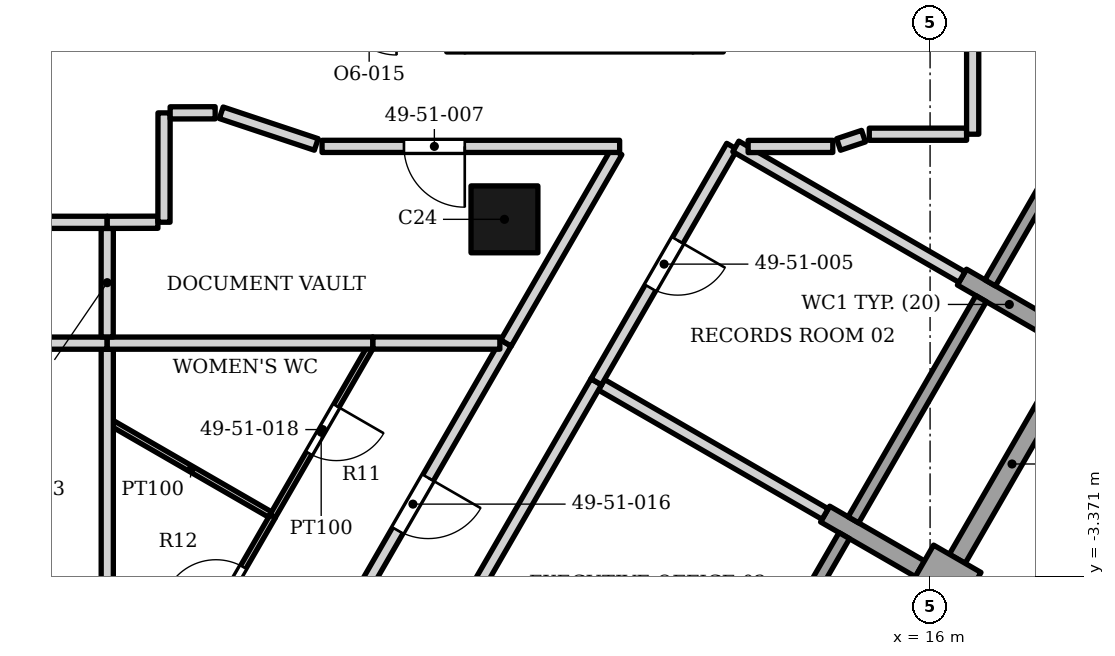
"""IFC4 building model, lengths in metres.
Left out: names, types, materials, properties, quantities, classifications, styles, units other than length and angle.
Written with IfcOpenShell. Run it as: python <this file> out.ifc"""

import sys

from ifc_helpers import new_model, si_unit, direction, frame, frame_2d, origin, origin_2d, place, context, subcontext, project, spatial, rectangle, extrude, element, fill, save


model = new_model("IFC4")
c1 = context("Model", 3, precision=1e-05, world=origin(), true_north=direction((0.0, 1.0)))
c2 = subcontext(c1, "Body", "Model", "MODEL_VIEW")
j1 = project(units=[si_unit("LENGTHUNIT", "METRE"), si_unit("PLANEANGLEUNIT", "RADIAN")], contexts=[c1])
p1 = place(None, origin())
s1 = spatial("IfcSite", under=j1, at=p1, CompositionType="ELEMENT")
p2 = place(p1, origin())
s2 = spatial("IfcBuilding", under=s1, at=p2, CompositionType="ELEMENT")
p3 = place(p2, frame((0.0, 0.0, 208.1)))
s3 = spatial("IfcBuildingStorey", under=s2, at=p3, CompositionType="ELEMENT", Elevation=208.1)
p4 = place(p3, frame((9.0, 2.5, 0.0), z_axis=(0.0, 0.0, 1.0), x_axis=(1.0, 0.0, 0.0)))
e1 = element("IfcColumn", 1, at=p4, inside=s3, PredefinedType="COLUMN", context=c2, shape_type="SweptSolid", body=[
    extrude(rectangle(XDim=1.1, YDim=1.1, at=origin_2d()), origin(), (0.0, 0.0, 1.0), 3.9),
])
p5 = place(p3, frame((16.612, -3.697, 0.0), z_axis=(0.0, 0.0, 1.0), x_axis=(-0.865964261186, 0.500105887137, 0.0)))
e2 = element("IfcWall", 2, at=p5, inside=s3, PredefinedType="SOLIDWALL", context=c2, shape_type="SweptSolid", body=[
    extrude(rectangle(XDim=0.9, YDim=0.9, at=frame_2d((0.45, 0.0))), origin(), (0.0, 0.0, 1.0), 3.0),
])
p6 = place(p3, frame((15.833, -3.247, 0.0), z_axis=(0.0, 0.0, 1.0), x_axis=(-0.866047807691, 0.499961193289, 0.0)))
e3 = element("IfcWall", 3, at=p6, inside=s3, PredefinedType="SOLIDWALL", context=c2, shape_type="SweptSolid", body=[
    extrude(rectangle(XDim=1.8, YDim=0.3, at=frame_2d((0.9, 0.0))), origin(), (0.0, 0.0, 1.0), 3.0),
])
p7 = place(p3, frame((16.524, 1.55, 0.0), z_axis=(0.0, 0.0, 1.0), x_axis=(0.866013897511, -0.50001992892, 0.0)))
e4 = element("IfcWall", 4, at=p7, inside=s3, PredefinedType="SOLIDWALL", context=c2, shape_type="SweptSolid", body=[
    extrude(rectangle(XDim=1.8, YDim=0.3, at=frame_2d((0.9, 0.0))), origin(), (0.0, 0.0, 1.0), 3.0),
])
p8 = place(p3, frame((12.489, -6.339, 0.0), z_axis=(0.0, 0.0, 1.0), x_axis=(0.500027713859, 0.866009402589, 0.0)))
e5 = element("IfcWall", 5, at=p8, inside=s3, PredefinedType="ELEMENTEDWALL", context=c2, shape_type="SweptSolid", body=[
    extrude(rectangle(XDim=4.2, YDim=0.2, at=frame_2d((2.1, 0.0))), origin(), (0.0, 0.0, 1.0), 3.0),
])
p9 = place(p3, frame((16.448, -3.082, 0.0), z_axis=(0.0, 0.0, 1.0), x_axis=(0.500012057535, 0.866018442252, 0.0)))
e6 = element("IfcWall", 6, at=p9, inside=s3, PredefinedType="SOLIDWALL", context=c2, shape_type="SweptSolid", body=[
    extrude(rectangle(XDim=3.6, YDim=0.3, at=frame_2d((1.8, 0.0))), origin(), (0.0, 0.0, 1.0), 3.0),
])
p10 = place(p3, frame((14.739, -2.442, 0.0), z_axis=(0.0, 0.0, 1.0), x_axis=(0.500027713859, 0.866009402589, 0.0)))
e7 = element("IfcWall", 7, at=p10, inside=s3, PredefinedType="ELEMENTEDWALL", context=c2, shape_type="SweptSolid", body=[
    extrude(rectangle(XDim=4.2, YDim=0.2, at=frame_2d((2.1, 0.0))), origin(), (0.0, 0.0, 1.0), 3.0),
])
p11 = place(p3, frame((16.989, 1.455, 0.0), z_axis=(0.0, 0.0, 1.0), x_axis=(0.500002543286, 0.866023935413, 0.0)))
e8 = element("IfcWall", 8, at=p11, inside=s3, PredefinedType="ELEMENTEDWALL", context=c2, shape_type="SweptSolid", body=[
    extrude(rectangle(XDim=4.2, YDim=0.2, at=frame_2d((2.1, 0.0))), origin(), (0.0, 0.0, 1.0), 3.0),
])
p12 = place(p3, frame((2.469, -10.893, 0.0), z_axis=(0.0, 0.0, 1.0), x_axis=(0.499769731946, 0.866158308296, 0.0)))
e9 = element("IfcWall", 9, at=p12, inside=s3, PredefinedType="PARTITIONING", context=c2, shape_type="SweptSolid", body=[
    extrude(rectangle(XDim=13.113, YDim=0.2, at=frame_2d((6.557, 0.0))), origin(), (0.0, 0.0, 1.0), 2.884),
])
p13 = place(p12, frame((3.048, 0.0, 0.0)))
e10 = element("IfcOpeningElement", 10, at=p13, cuts=e9, PredefinedType="OPENING", context=c2, shape_type="SweptSolid", body=[
    extrude(rectangle(XDim=0.9, YDim=2.1, at=frame_2d((0.45, 1.05))), frame((0.0, 0.11, 0.0), z_axis=(0.0, -1.0, 0.0), x_axis=(1.0, 0.0, 0.0)), (0.0, 0.0, 1.0), 0.22),
])
p14 = place(p12, frame((9.556, 0.0, 0.0)))
e11 = element("IfcOpeningElement", 11, at=p14, cuts=e9, PredefinedType="OPENING", context=c2, shape_type="SweptSolid", body=[
    extrude(rectangle(XDim=1.0, YDim=2.1, at=frame_2d((0.5, 1.05))), frame((0.0, 0.11, 0.0), z_axis=(0.0, -1.0, 0.0), x_axis=(1.0, 0.0, 0.0)), (0.0, 0.0, 1.0), 0.22),
])
p15 = place(p3, frame((3.821, -4.748, 0.0), z_axis=(0.0, 0.0, 1.0), x_axis=(0.500518638442, 0.865725760603, 0.0)))
e12 = element("IfcWall", 12, at=p15, inside=s3, PredefinedType="PARTITIONING", context=c2, shape_type="SweptSolid", body=[
    extrude(rectangle(XDim=2.733, YDim=0.1, at=frame_2d((1.367, 0.0))), origin(), (0.0, 0.0, 1.0), 2.884),
])
p16 = place(p15, frame((0.867, 0.0, 0.0)))
e13 = element("IfcOpeningElement", 13, at=p16, cuts=e12, PredefinedType="OPENING", context=c2, shape_type="SweptSolid", body=[
    extrude(rectangle(XDim=0.9, YDim=2.1, at=frame_2d((0.45, 1.05))), frame((0.0, 0.06, 0.0), z_axis=(0.0, -1.0, 0.0), x_axis=(1.0, 0.0, 0.0)), (0.0, 0.0, 1.0), 0.12),
])
p17 = place(p3, frame((5.189, -2.379, 0.0), z_axis=(0.0, 0.0, 1.0), x_axis=(0.500398861512, 0.865794998482, 0.0)))
e14 = element("IfcWall", 14, at=p17, inside=s3, PredefinedType="PARTITIONING", context=c2, shape_type="SweptSolid", body=[
    extrude(rectangle(XDim=3.187, YDim=0.1, at=frame_2d((1.593, 0.0))), origin(), (0.0, 0.0, 1.0), 3.73),
])
p18 = place(p17, frame((1.192, 0.0, 0.0)))
e15 = element("IfcOpeningElement", 15, at=p18, cuts=e14, PredefinedType="OPENING", context=c2, shape_type="SweptSolid", body=[
    extrude(rectangle(XDim=0.9, YDim=2.1, at=frame_2d((0.45, 1.05))), frame((0.0, 0.06, 0.0), z_axis=(0.0, -1.0, 0.0), x_axis=(1.0, 0.0, 0.0)), (0.0, 0.0, 1.0), 0.12),
])
p19 = place(p3, frame((2.552, -0.858, 0.0), z_axis=(0.0, 0.0, 1.0), x_axis=(0.866076950936, -0.499910707084, 0.0)))
e16 = element("IfcWall", 16, at=p19, inside=s3, PredefinedType="PARTITIONING", context=c2, shape_type="SweptSolid", body=[
    extrude(rectangle(XDim=2.994, YDim=0.1, at=frame_2d((1.497, 0.0))), origin(), (0.0, 0.0, 1.0), 2.884),
])
p20 = place(p3, frame((10.596, -0.221, 0.0), z_axis=(0.0, 0.0, 1.0), x_axis=(0.86582081126, -0.500354197333, 0.0)))
e17 = element("IfcWall", 17, at=p20, inside=s3, PredefinedType="PARTITIONING", context=c2, shape_type="SweptSolid", body=[
    extrude(rectangle(XDim=4.248, YDim=0.2, at=frame_2d((2.124, 0.0))), origin(), (0.0, 0.0, 1.0), 3.052),
])
p21 = place(p3, frame((3.759, -11.864, 0.0), z_axis=(0.0, 0.0, 1.0), x_axis=(0.499997969693, 0.866026575979, 0.0)))
e18 = element("IfcWall", 18, at=p21, inside=s3, PredefinedType="PARTITIONING", context=c2, shape_type="SweptSolid", body=[
    extrude(rectangle(XDim=13.5, YDim=0.2, at=frame_2d((6.75, 0.0))), origin(), (0.0, 0.0, 1.0), 2.884),
])
p22 = place(p21, frame((1.8, 0.0, 0.0)))
e19 = element("IfcOpeningElement", 19, at=p22, cuts=e18, PredefinedType="OPENING", context=c2, shape_type="SweptSolid", body=[
    extrude(rectangle(XDim=0.9, YDim=2.1, at=frame_2d((0.45, 1.05))), frame((0.0, 0.11, 0.0), z_axis=(0.0, -1.0, 0.0), x_axis=(1.0, 0.0, 0.0)), (0.0, 0.0, 1.0), 0.22),
])
p23 = place(p21, frame((8.5, 0.0, 0.0)))
e20 = element("IfcOpeningElement", 20, at=p23, cuts=e18, PredefinedType="OPENING", context=c2, shape_type="SweptSolid", body=[
    extrude(rectangle(XDim=1.0, YDim=2.4, at=frame_2d((0.5, 1.2))), frame((0.0, 0.11, 0.0), z_axis=(0.0, -1.0, 0.0), x_axis=(1.0, 0.0, 0.0)), (0.0, 0.0, 1.0), 0.22),
])
p24 = place(p3, frame((2.468, -4.835, 0.0), z_axis=(0.0, 0.0, 1.0), x_axis=(0.0, 1.0, 0.0)))
e21 = element("IfcWall", 21, at=p24, inside=s3, PredefinedType="PARTITIONING", context=c2, shape_type="SweptSolid", body=[
    extrude(rectangle(XDim=5.199, YDim=0.2, at=frame_2d((2.6, 0.0))), origin(), (0.0, 0.0, 1.0), 3.73),
])
p25 = place(p3, frame((-4.086, 0.464, 0.0), z_axis=(0.0, 0.0, 1.0), x_axis=(0.499999074482, -0.866025938132, 0.0)))
e22 = element("IfcWall", 22, at=p25, inside=s3, PredefinedType="PARTITIONING", context=c2, shape_type="SweptSolid", body=[
    extrude(rectangle(XDim=13.013, YDim=0.2, at=frame_2d((6.507, 0.0))), origin(), (0.0, 0.0, 1.0), 2.884),
])
p26 = place(p25, frame((2.607, 0.0, 0.0)))
e23 = element("IfcOpeningElement", 23, at=p26, cuts=e22, PredefinedType="OPENING", context=c2, shape_type="SweptSolid", body=[
    extrude(rectangle(XDim=0.9, YDim=2.1, at=frame_2d((0.45, 1.05))), frame((0.0, 0.11, 0.0), z_axis=(0.0, -1.0, 0.0), x_axis=(1.0, 0.0, 0.0)), (0.0, 0.0, 1.0), 0.22),
])
p27 = place(p3, frame((-3.986, 0.464, 0.0), z_axis=(0.0, 0.0, 1.0), x_axis=(1.0, 0.0, 0.0)))
e24 = element("IfcWall", 24, at=p27, inside=s3, PredefinedType="PARTITIONING", context=c2, shape_type="SweptSolid", body=[
    extrude(rectangle(XDim=6.452, YDim=0.2, at=frame_2d((3.226, 0.0))), origin(), (0.0, 0.0, 1.0), 2.884),
])
p28 = place(p3, frame((6.833, 0.466, 0.0), z_axis=(0.0, 0.0, 1.0), x_axis=(0.999999665949, -0.000817374785, 0.0)))
e25 = element("IfcWall", 25, at=p28, inside=s3, PredefinedType="PARTITIONING", context=c2, shape_type="SweptSolid", body=[
    extrude(rectangle(XDim=2.091, YDim=0.2, at=frame_2d((1.045, 0.0))), origin(), (0.0, 0.0, 1.0), 3.73),
])
p29 = place(p3, frame((2.468, 0.464, 0.0), z_axis=(0.0, 0.0, 1.0), x_axis=(0.999999923373, 0.000391476957, 0.0)))
e26 = element("IfcWall", 26, at=p29, inside=s3, PredefinedType="PARTITIONING", context=c2, shape_type="SweptSolid", body=[
    extrude(rectangle(XDim=4.365, YDim=0.2, at=frame_2d((2.183, 0.0))), origin(), (0.0, 0.0, 1.0), 3.73),
])
p30 = place(p3, frame((9.025, 0.466, 0.0), z_axis=(0.0, 0.0, 1.0), x_axis=(0.500421935149, 0.865781662327, 0.0)))
e27 = element("IfcWall", 27, at=p30, inside=s3, PredefinedType="PARTITIONING", context=c2, shape_type="SweptSolid", body=[
    extrude(rectangle(XDim=3.635, YDim=0.2, at=frame_2d((1.817, 0.0))), origin(), (0.0, 0.0, 1.0), 3.052),
])
p31 = place(p3, frame((2.466, 0.566, 0.0), z_axis=(0.0, 0.0, 1.0), x_axis=(0.000820793157, 0.999999663149, 0.0)))
e28 = element("IfcWall", 28, at=p31, inside=s3, PredefinedType="PARTITIONING", context=c2, shape_type="SweptSolid", body=[
    extrude(rectangle(XDim=1.785, YDim=0.2, at=frame_2d((0.892, 0.0))), origin(), (0.0, 0.0, 1.0), 3.73),
])
p32 = place(p3, frame((-3.4, 2.452, 0.0), z_axis=(0.0, 0.0, 1.0), x_axis=(0.999999957561, -0.000291338898, 0.0)))
e29 = element("IfcWall", 29, at=p32, inside=s3, PredefinedType="PARTITIONING", context=c2, shape_type="SweptSolid", body=[
    extrude(rectangle(XDim=5.866, YDim=0.2, at=frame_2d((2.933, 0.0))), origin(), (0.0, 0.0, 1.0), 3.73),
])
p33 = place(p32, frame((2.433, 0.0, 0.0)))
e30 = element("IfcOpeningElement", 30, at=p33, cuts=e29, PredefinedType="OPENING", context=c2, shape_type="SweptSolid", body=[
    extrude(rectangle(XDim=1.0, YDim=2.4, at=frame_2d((0.5, 1.2))), frame((0.0, 0.11, 0.0), z_axis=(0.0, -1.0, 0.0), x_axis=(1.0, 0.0, 0.0)), (0.0, 0.0, 1.0), 0.22),
])
p34 = place(p3, frame((2.468, 2.451, 0.0), z_axis=(0.0, 0.0, 1.0), x_axis=(0.999997893042, 0.002052781599, 0.0)))
e31 = element("IfcWall", 31, at=p34, inside=s3, PredefinedType="PARTITIONING", context=c2, shape_type="SweptSolid", body=[
    extrude(rectangle(XDim=0.833, YDim=0.2, at=frame_2d((0.416, 0.0))), origin(), (0.0, 0.0, 1.0), 3.73),
])
p35 = place(p3, frame((6.0, 3.7, 0.0), z_axis=(0.0, 0.0, 1.0), x_axis=(1.0, 0.0, 0.0)))
e32 = element("IfcWall", 32, at=p35, inside=s3, PredefinedType="PARTITIONING", context=c2, shape_type="SweptSolid", body=[
    extrude(rectangle(XDim=4.894, YDim=0.2, at=frame_2d((2.447, 0.0))), origin(), (0.0, 0.0, 1.0), 3.332),
])
p36 = place(p35, frame((1.347, 0.0, 0.0)))
e33 = element("IfcOpeningElement", 33, at=p36, cuts=e32, PredefinedType="OPENING", context=c2, shape_type="SweptSolid", body=[
    extrude(rectangle(XDim=1.0, YDim=2.1, at=frame_2d((0.5, 1.05))), frame((0.0, 0.11, 0.0), z_axis=(0.0, -1.0, 0.0), x_axis=(1.0, 0.0, 0.0)), (0.0, 0.0, 1.0), 0.22),
])
p37 = place(p3, frame((10.51, -0.171, 0.0), z_axis=(0.0, 0.0, 1.0), x_axis=(0.499676732976, 0.86621196166, 0.0)))
e34 = element("IfcWall", 34, at=p37, inside=s3, PredefinedType="PARTITIONING", context=c2, shape_type="SweptSolid", body=[
    extrude(rectangle(XDim=4.469, YDim=0.2, at=frame_2d((2.234, 0.0))), origin(), (0.0, 0.0, 1.0), 3.73),
])
p38 = place(p37, frame((1.783, 0.0, 0.0)))
e35 = element("IfcOpeningElement", 35, at=p38, cuts=e34, PredefinedType="OPENING", context=c2, shape_type="SweptSolid", body=[
    extrude(rectangle(XDim=0.9, YDim=2.1, at=frame_2d((0.45, 1.05))), frame((0.0, 0.11, 0.0), z_axis=(0.0, -1.0, 0.0), x_axis=(1.0, 0.0, 0.0)), (0.0, 0.0, 1.0), 0.22),
])
p39 = place(p3, frame((12.805, 3.699, 0.0), z_axis=(0.0, 0.0, 1.0), x_axis=(0.86584756398, -0.500307901146, 0.0)))
e36 = element("IfcWall", 36, at=p39, inside=s3, PredefinedType="PARTITIONING", context=c2, shape_type="SweptSolid", body=[
    extrude(rectangle(XDim=4.295, YDim=0.2, at=frame_2d((2.147, 0.0))), origin(), (0.0, 0.0, 1.0), 3.052),
])
p40 = place(p3, frame((13.008, 3.698, 0.0), z_axis=(0.0, 0.0, 1.0), x_axis=(0.999999615671, 0.000876731208, 0.0)))
e37 = element("IfcWall", 37, at=p40, inside=s3, PredefinedType="PARTITIONING", context=c2, shape_type="SweptSolid", body=[
    extrude(rectangle(XDim=1.392, YDim=0.2, at=frame_2d((0.696, 0.0))), origin(), (0.0, 0.0, 1.0), 3.73),
])
p41 = place(p3, frame((4.342, 4.252, 0.0), z_axis=(0.0, 0.0, 1.0), x_axis=(0.948668476379, -0.316272227557, 0.0)))
e38 = element("IfcWall", 38, at=p41, inside=s3, PredefinedType="PARTITIONING", context=c2, shape_type="SweptSolid", body=[
    extrude(rectangle(XDim=1.647, YDim=0.2, at=frame_2d((0.824, 0.0))), origin(), (0.0, 0.0, 1.0), 2.884),
])
p42 = place(p3, frame((14.495, 3.731, 0.0), z_axis=(0.0, 0.0, 1.0), x_axis=(0.948739721949, 0.316058443957, 0.0)))
e39 = element("IfcWall", 39, at=p42, inside=s3, PredefinedType="PARTITIONING", context=c2, shape_type="SweptSolid", body=[
    extrude(rectangle(XDim=0.433, YDim=0.2, at=frame_2d((0.216, 0.0))), origin(), (0.0, 0.0, 1.0), 3.73),
])
p43 = place(p3, frame((15.0, 3.899, 0.0), z_axis=(0.0, 0.0, 1.0), x_axis=(0.999999953468, 0.000305064049, 0.0)))
e40 = element("IfcWall", 40, at=p43, inside=s3, PredefinedType="PARTITIONING", context=c2, shape_type="SweptSolid", body=[
    extrude(rectangle(XDim=1.601, YDim=0.2, at=frame_2d((0.8, 0.0))), origin(), (0.0, 0.0, 1.0), 3.73),
])
p44 = place(p3, frame((3.4, 2.452, 0.0), z_axis=(0.0, 0.0, 1.0), x_axis=(0.001086217961, 0.999999410065, 0.0)))
e41 = element("IfcWall", 41, at=p44, inside=s3, PredefinedType="PARTITIONING", context=c2, shape_type="SweptSolid", body=[
    extrude(rectangle(XDim=1.798, YDim=0.2, at=frame_2d((0.899, 0.0))), origin(), (0.0, 0.0, 1.0), 3.73),
])
p45 = place(p3, frame((3.502, 4.251, 0.0), z_axis=(0.0, 0.0, 1.0), x_axis=(0.999998041999, 0.001978887946, 0.0)))
e42 = element("IfcWall", 42, at=p45, inside=s3, PredefinedType="PARTITIONING", context=c2, shape_type="SweptSolid", body=[
    extrude(rectangle(XDim=0.74, YDim=0.2, at=frame_2d((0.37, 0.0))), origin(), (0.0, 0.0, 1.0), 3.73),
])
p46 = place(p3, frame((16.7, 3.9, 0.0), z_axis=(0.0, 0.0, 1.0), x_axis=(0.0, 1.0, 0.0)))
e43 = element("IfcWall", 43, at=p46, inside=s3, PredefinedType="PARTITIONING", context=c2, shape_type="SweptSolid", body=[
    extrude(rectangle(XDim=2.353, YDim=0.2, at=frame_2d((1.176, 0.0))), origin(), (0.0, 0.0, 1.0), 3.73),
])
p47 = place(p38, origin())
e44 = element("IfcDoor", 44, at=p47, inside=s3, OperationType="SINGLE_SWING_RIGHT", PredefinedType="DOOR", context=c2, shape_type="SweptSolid", body=[
    extrude(rectangle(XDim=0.9, YDim=2.1, at=frame_2d((0.45, 1.05))), frame((0.0, 0.025, 0.0), z_axis=(0.0, -1.0, 0.0), x_axis=(1.0, 0.0, 0.0)), (0.0, 0.0, 1.0), 0.05),
])
fill(e35, e44)
p48 = place(p36, origin())
e45 = element("IfcDoor", 45, at=p48, inside=s3, OperationType="SINGLE_SWING_RIGHT", PredefinedType="DOOR", context=c2, shape_type="SweptSolid", body=[
    extrude(rectangle(XDim=1.0, YDim=2.1, at=frame_2d((0.5, 1.05))), frame((0.0, 0.025, 0.0), z_axis=(0.0, -1.0, 0.0), x_axis=(1.0, 0.0, 0.0)), (0.0, 0.0, 1.0), 0.05),
])
fill(e33, e45)
p49 = place(p14, origin())
e46 = element("IfcDoor", 46, at=p49, inside=s3, OperationType="SINGLE_SWING_RIGHT", PredefinedType="DOOR", context=c2, shape_type="SweptSolid", body=[
    extrude(rectangle(XDim=1.0, YDim=2.1, at=frame_2d((0.5, 1.05))), frame((0.0, 0.025, 0.0), z_axis=(0.0, -1.0, 0.0), x_axis=(1.0, 0.0, 0.0)), (0.0, 0.0, 1.0), 0.05),
])
fill(e11, e46)
p50 = place(p16, origin())
e47 = element("IfcDoor", 47, at=p50, inside=s3, OperationType="SINGLE_SWING_LEFT", PredefinedType="DOOR", context=c2, shape_type="SweptSolid", body=[
    extrude(rectangle(XDim=0.9, YDim=2.1, at=frame_2d((0.45, 1.05))), frame((0.0, 0.025, 0.0), z_axis=(0.0, -1.0, 0.0), x_axis=(1.0, 0.0, 0.0)), (0.0, 0.0, 1.0), 0.05),
])
fill(e13, e47)
p51 = place(p18, origin())
e48 = element("IfcDoor", 48, at=p51, inside=s3, OperationType="SINGLE_SWING_RIGHT", PredefinedType="DOOR", context=c2, shape_type="SweptSolid", body=[
    extrude(rectangle(XDim=0.9, YDim=2.1, at=frame_2d((0.45, 1.05))), frame((0.0, 0.025, 0.0), z_axis=(0.0, -1.0, 0.0), x_axis=(1.0, 0.0, 0.0)), (0.0, 0.0, 1.0), 0.05),
])
fill(e15, e48)
save(model, sys.argv[1])
